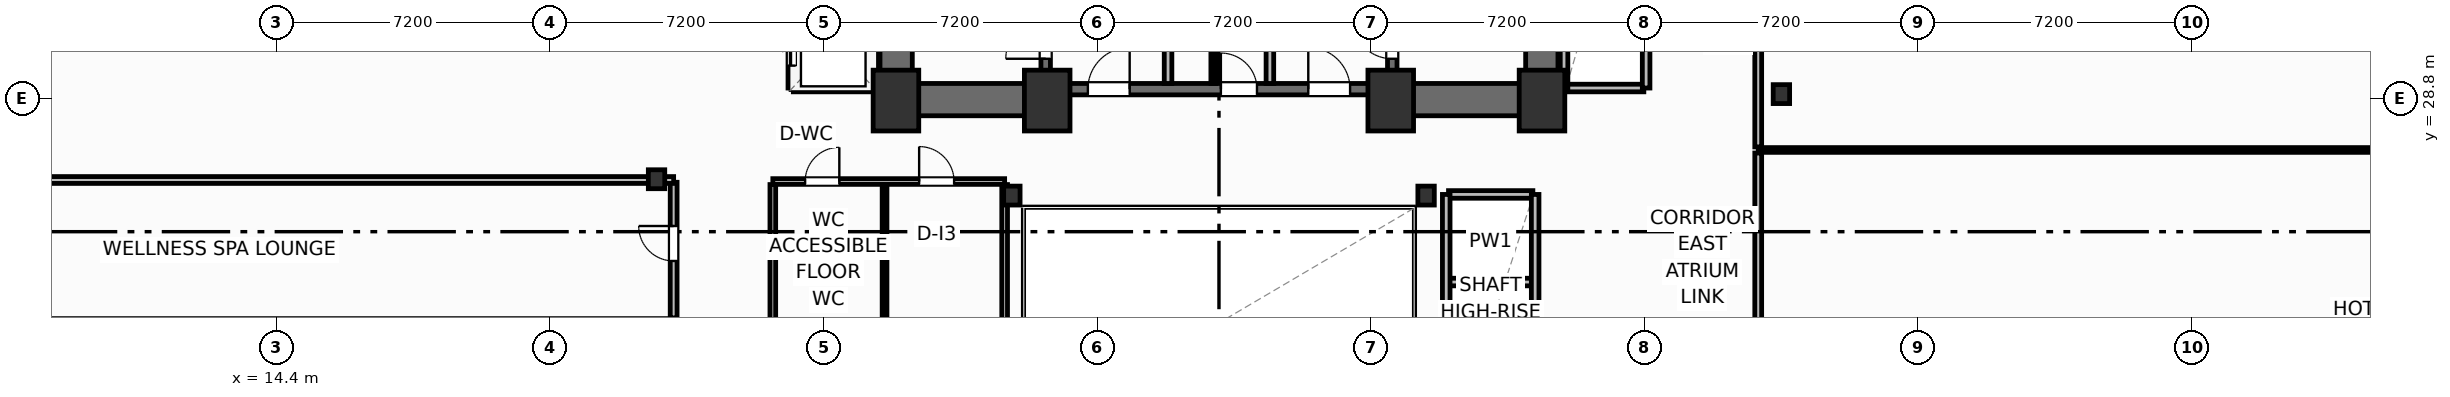
"""IFC4 building model, lengths in metres.
Left out: names, types, materials, properties, quantities, classifications, styles, units other than length and angle.
Written with IfcOpenShell. Run it as: python <this file> out.ifc"""

import sys

from ifc_helpers import new_model, si_unit, direction, frame, frame_2d, origin, origin_2d, place, context, subcontext, project, spatial, rectangle, i_section, extrude, element, fill, save


model = new_model("IFC4")
c1 = context("Model", 3, precision=1e-05, world=origin(), true_north=direction((0.0, 1.0)))
c2 = subcontext(c1, "Body", "Model", "MODEL_VIEW")
j1 = project(units=[si_unit("LENGTHUNIT", "METRE"), si_unit("PLANEANGLEUNIT", "RADIAN")], contexts=[c1])
p1 = place(None, origin())
s1 = spatial("IfcSite", under=j1, at=p1, CompositionType="ELEMENT")
p2 = place(p1, origin())
s2 = spatial("IfcBuilding", under=s1, at=p2, CompositionType="ELEMENT")
p3 = place(p2, frame((0.0, 0.0, 45.5)))
s3 = spatial("IfcBuildingStorey", under=s2, at=p3, CompositionType="ELEMENT", Elevation=45.5)
for number, where, z_axis, x_axis in (
    (1, (30.7, 28.75, 0.0), (0.0, 0.0, 1.0), (1.0, 0.0, 0.0)),
    (2, (34.68, 28.75, 0.0), (0.0, 0.0, 1.0), (1.0, 0.0, 0.0)),
    (3, (43.72, 28.75, 0.0), (0.0, 0.0, 1.0), (1.0, 0.0, 0.0)),
    (4, (47.7, 28.75, 0.0), (0.0, 0.0, 1.0), (1.0, 0.0, 0.0)),
):
    element("IfcColumn", number, at=place(p3, frame(where, z_axis=z_axis, x_axis=x_axis)), inside=s3, PredefinedType="COLUMN", context=c2, shape_type="SweptSolid", body=[
        extrude(rectangle(XDim=1.2, YDim=1.6, at=origin_2d()), origin(), (0.0, 0.0, 1.0), 3.7),
    ])
for number, where, z_axis, x_axis in (
    (5, (33.75, 26.25, 0.0), (0.0, 0.0, 1.0), (1.0, 0.0, 0.0)),
    (6, (44.65, 26.25, 0.0), (0.0, 0.0, 1.0), (1.0, 0.0, 0.0)),
    (7, (24.4, 26.68, 0.0), (0.0, 0.0, 1.0), (1.0, 0.0, 0.0)),
    (8, (54.0, 28.92, 0.0), (0.0, 0.0, 1.0), (1.0, 0.0, 0.0)),
):
    element("IfcColumn", number, at=place(p3, frame(where, z_axis=z_axis, x_axis=x_axis)), inside=s3, PredefinedType="COLUMN", context=c2, shape_type="SweptSolid", body=[
        extrude(i_section(OverallWidth=0.432, OverallDepth=0.498, WebThickness=0.056, FlangeThickness=0.089, FilletRadius=0.025, at=origin_2d()), origin(), (0.0, 0.0, 1.0), 3.7),
    ])
for number, where, z_axis, x_axis in (
    (9, (30.705, 29.2, 0.0), (0.0, 0.0, 1.0), (0.0, 1.0, 0.0)),
    (10, (47.695, 29.2, 0.0), (0.0, 0.0, 1.0), (0.0, 1.0, 0.0)),
):
    element("IfcWall", number, at=place(p3, frame(where, z_axis=z_axis, x_axis=x_axis)), inside=s3, PredefinedType="SHEAR", context=c2, shape_type="SweptSolid", body=[
        extrude(rectangle(XDim=9.22, YDim=0.85, at=frame_2d((4.61, 0.0))), origin(), (0.0, 0.0, 1.0), 3.45),
    ])
for number, where, z_axis, x_axis in (
    (11, (30.28, 28.775, 0.0), (0.0, 0.0, 1.0), (1.0, 0.0, 0.0)),
    (12, (43.6, 28.775, 0.0), (0.0, 0.0, 1.0), (1.0, 0.0, 0.0)),
):
    element("IfcWall", number, at=place(p3, frame(where, z_axis=z_axis, x_axis=x_axis)), inside=s3, PredefinedType="SHEAR", context=c2, shape_type="SweptSolid", body=[
        extrude(rectangle(XDim=4.52, YDim=0.85, at=frame_2d((2.26, 0.0))), origin(), (0.0, 0.0, 1.0), 3.45),
    ])
p4 = place(p3, frame((34.8, 29.05, 0.0), z_axis=(0.0, 0.0, 1.0), x_axis=(1.0, 0.0, 0.0)))
e13 = element("IfcWall", 13, at=p4, inside=s3, PredefinedType="SHEAR", context=c2, shape_type="SweptSolid", body=[
    extrude(rectangle(XDim=8.8, YDim=0.3, at=frame_2d((4.4, 0.0))), origin(), (0.0, 0.0, 1.0), 3.45),
])
p5 = place(p4, frame((0.95, 0.0, 0.0)))
e14 = element("IfcOpeningElement", 14, at=p5, cuts=e13, PredefinedType="OPENING", context=c2, shape_type="SweptSolid", body=[
    extrude(rectangle(XDim=1.1, YDim=2.15, at=frame_2d((0.55, 1.075))), frame((0.0, 0.16, 0.0), z_axis=(0.0, -1.0, 0.0), x_axis=(1.0, 0.0, 0.0)), (0.0, 0.0, 1.0), 0.32),
])
p6 = place(p4, frame((6.75, 0.0, 0.0)))
e15 = element("IfcOpeningElement", 15, at=p6, cuts=e13, PredefinedType="OPENING", context=c2, shape_type="SweptSolid", body=[
    extrude(rectangle(XDim=1.1, YDim=2.15, at=frame_2d((0.55, 1.075))), frame((0.0, 0.16, 0.0), z_axis=(0.0, -1.0, 0.0), x_axis=(1.0, 0.0, 0.0)), (0.0, 0.0, 1.0), 0.32),
])
p7 = place(p4, frame((4.45, 0.0, 0.0)))
e16 = element("IfcOpeningElement", 16, at=p7, cuts=e13, PredefinedType="OPENING", context=c2, shape_type="SweptSolid", body=[
    extrude(rectangle(XDim=0.95, YDim=2.15, at=frame_2d((0.475, 1.075))), frame((0.0, 0.16, 0.0), z_axis=(0.0, -1.0, 0.0), x_axis=(1.0, 0.0, 0.0)), (0.0, 0.0, 1.0), 0.32),
])
p8 = place(p3, frame((34.64, 29.2, 0.0), z_axis=(0.0, 0.0, 1.0), x_axis=(0.0, 1.0, 0.0)))
e17 = element("IfcWall", 17, at=p8, inside=s3, PredefinedType="SHEAR", context=c2, shape_type="SweptSolid", body=[
    extrude(rectangle(XDim=9.22, YDim=0.25, at=frame_2d((4.61, 0.0))), origin(), (0.0, 0.0, 1.0), 3.45),
])
p9 = place(p8, frame((0.65, 0.0, 0.0)))
e18 = element("IfcOpeningElement", 18, at=p9, cuts=e17, PredefinedType="OPENING", context=c2, shape_type="SweptSolid", body=[
    extrude(rectangle(XDim=1.05, YDim=2.15, at=frame_2d((0.525, 1.075))), frame((0.0, 0.135, 0.0), z_axis=(0.0, -1.0, 0.0), x_axis=(1.0, 0.0, 0.0)), (0.0, 0.0, 1.0), 0.27),
])
p10 = place(p3, frame((43.76, 29.2, 0.0), z_axis=(0.0, 0.0, 1.0), x_axis=(0.0, 1.0, 0.0)))
e19 = element("IfcWall", 19, at=p10, inside=s3, PredefinedType="SHEAR", context=c2, shape_type="SweptSolid", body=[
    extrude(rectangle(XDim=9.22, YDim=0.25, at=frame_2d((4.61, 0.0))), origin(), (0.0, 0.0, 1.0), 3.45),
])
p11 = place(p10, frame((0.65, 0.0, 0.0)))
e20 = element("IfcOpeningElement", 20, at=p11, cuts=e19, PredefinedType="OPENING", context=c2, shape_type="SweptSolid", body=[
    extrude(rectangle(XDim=1.05, YDim=2.15, at=frame_2d((0.525, 1.075))), frame((0.0, 0.135, 0.0), z_axis=(0.0, -1.0, 0.0), x_axis=(1.0, 0.0, 0.0)), (0.0, 0.0, 1.0), 0.27),
])
p12 = place(p3, frame((-2.728, 23.605, 0.0), z_axis=(0.0, 0.0, 1.0), x_axis=(0.823535075462, -0.567265351915, 0.0)))
e21 = element("IfcWall", 21, at=p12, inside=s3, PredefinedType="SOLIDWALL", context=c2, shape_type="SweptSolid", body=[
    extrude(rectangle(XDim=23.247, YDim=0.22, at=frame_2d((11.624, 0.0))), origin(), (0.0, 0.0, 1.0), 2.73),
])
p13 = place(p12, frame((3.887, 0.0, 0.8)))
e22 = element("IfcOpeningElement", 22, at=p13, cuts=e21, PredefinedType="OPENING", context=c2, shape_type="SweptSolid", body=[
    extrude(rectangle(XDim=1.65, YDim=1.65, at=frame_2d((0.825, 0.825))), frame((0.0, 0.12, 0.0), z_axis=(0.0, -1.0, 0.0), x_axis=(1.0, 0.0, 0.0)), (0.0, 0.0, 1.0), 0.24),
])
p14 = place(p3, frame((81.127, 26.995, 0.0), z_axis=(0.0, 0.0, 1.0), x_axis=(-0.823530169317, 0.567272474411, 0.0)))
e23 = element("IfcWall", 23, at=p14, inside=s3, PredefinedType="SOLIDWALL", context=c2, shape_type="SweptSolid", body=[
    extrude(rectangle(XDim=23.247, YDim=0.22, at=frame_2d((11.624, 0.0))), origin(), (0.0, 0.0, 1.0), 2.73),
])
p15 = place(p14, frame((10.799, 0.0, 0.8)))
e24 = element("IfcOpeningElement", 24, at=p15, cuts=e23, PredefinedType="OPENING", context=c2, shape_type="SweptSolid", body=[
    extrude(rectangle(XDim=1.65, YDim=1.65, at=frame_2d((0.825, 0.825))), frame((0.0, 0.12, 0.0), z_axis=(0.0, -1.0, 0.0), x_axis=(1.0, 0.0, 0.0)), (0.0, 0.0, 1.0), 0.24),
])
p16 = place(p3, frame((24.85, 23.03, 0.0), z_axis=(0.0, 0.0, 1.0), x_axis=(0.0, 1.0, 0.0)))
e25 = element("IfcWall", 25, at=p16, inside=s3, PredefinedType="PARTITIONING", context=c2, shape_type="SweptSolid", body=[
    extrude(rectangle(XDim=3.57, YDim=0.18, at=frame_2d((1.785, 0.0))), origin(), (0.0, 0.0, 1.0), 3.45),
])
p17 = place(p16, frame((1.5, 0.0, 0.0)))
e26 = element("IfcOpeningElement", 26, at=p17, cuts=e25, PredefinedType="OPENING", context=c2, shape_type="SweptSolid", body=[
    extrude(rectangle(XDim=0.92, YDim=2.05, at=frame_2d((0.46, 1.025))), frame((0.0, 0.1, 0.0), z_axis=(0.0, -1.0, 0.0), x_axis=(1.0, 0.0, 0.0)), (0.0, 0.0, 1.0), 0.2),
])
p18 = place(p3, frame((0.2, 26.66, 0.0), z_axis=(0.0, 0.0, 1.0), x_axis=(1.0, 0.0, 0.0)))
e27 = element("IfcWall", 27, at=p18, inside=s3, PredefinedType="PARTITIONING", context=c2, shape_type="SweptSolid", body=[
    extrude(rectangle(XDim=24.65, YDim=0.18, at=frame_2d((12.325, 0.0))), origin(), (0.0, 0.0, 1.0), 2.662),
])
p19 = place(p3, frame((53.39, 19.3, 0.0), z_axis=(0.0, 0.0, 1.0), x_axis=(0.0, 1.0, 0.0)))
e28 = element("IfcWall", 28, at=p19, inside=s3, PredefinedType="PARTITIONING", context=c2, shape_type="SweptSolid", body=[
    extrude(rectangle(XDim=8.07, YDim=0.18, at=frame_2d((4.035, 0.0))), origin(), (0.0, 0.0, 1.0), 3.45),
])
p20 = place(p19, frame((2.2, 0.0, 0.0)))
e29 = element("IfcOpeningElement", 29, at=p20, cuts=e28, PredefinedType="OPENING", context=c2, shape_type="SweptSolid", body=[
    extrude(rectangle(XDim=0.92, YDim=2.05, at=frame_2d((0.46, 1.025))), frame((0.0, 0.1, 0.0), z_axis=(0.0, -1.0, 0.0), x_axis=(1.0, 0.0, 0.0)), (0.0, 0.0, 1.0), 0.2),
])
p21 = place(p3, frame((53.39, 27.53, 0.0), z_axis=(0.0, 0.0, 1.0), x_axis=(0.0, 1.0, 0.0)))
e30 = element("IfcWall", 30, at=p21, inside=s3, PredefinedType="PARTITIONING", context=c2, shape_type="SweptSolid", body=[
    extrude(rectangle(XDim=11.67, YDim=0.18, at=frame_2d((5.835, 0.0))), origin(), (0.0, 0.0, 1.0), 3.45),
])
p22 = place(p21, frame((5.8, 0.0, 0.0)))
e31 = element("IfcOpeningElement", 31, at=p22, cuts=e30, PredefinedType="OPENING", context=c2, shape_type="SweptSolid", body=[
    extrude(rectangle(XDim=0.92, YDim=2.05, at=frame_2d((0.46, 1.025))), frame((0.0, 0.1, 0.0), z_axis=(0.0, -1.0, 0.0), x_axis=(1.0, 0.0, 0.0)), (0.0, 0.0, 1.0), 0.2),
])
p23 = place(p3, frame((53.39, 27.45, 0.0), z_axis=(0.0, 0.0, 1.0), x_axis=(1.0, 0.0, 0.0)))
e32 = element("IfcWall", 32, at=p23, inside=s3, PredefinedType="PARTITIONING", context=c2, shape_type="SweptSolid", body=[
    extrude(rectangle(XDim=23.61, YDim=0.125, at=frame_2d((11.805, 0.0))), origin(), (0.0, 0.0, 1.0), 3.45),
])
for number, where, z_axis, x_axis in (
    (33, (37.86, 29.2, 0.0), (0.0, 0.0, 1.0), (0.0, 1.0, 0.0)),
    (34, (40.54, 29.2, 0.0), (0.0, 0.0, 1.0), (0.0, 1.0, 0.0)),
):
    element("IfcWall", number, at=place(p3, frame(where, z_axis=z_axis, x_axis=x_axis)), inside=s3, PredefinedType="PARTITIONING", context=c2, shape_type="SweptSolid", body=[
        extrude(rectangle(XDim=5.18, YDim=0.2, at=frame_2d((2.59, 0.0))), origin(), (0.0, 0.0, 1.0), 3.45),
    ])
p24 = place(p3, frame((39.05, 29.2, 0.0), z_axis=(0.0, 0.0, 1.0), x_axis=(0.0, 1.0, 0.0)))
e35 = element("IfcWall", 35, at=p24, inside=s3, PredefinedType="PARTITIONING", context=c2, shape_type="SweptSolid", body=[
    extrude(rectangle(XDim=5.22, YDim=0.125, at=frame_2d((2.61, 0.0))), origin(), (0.0, 0.0, 1.0), 3.45),
])
p25 = place(p24, frame((2.05, 0.0, 0.0)))
e36 = element("IfcOpeningElement", 36, at=p25, cuts=e35, PredefinedType="OPENING", context=c2, shape_type="SweptSolid", body=[
    extrude(rectangle(XDim=0.85, YDim=2.05, at=frame_2d((0.425, 1.025))), frame((0.0, 0.073, 0.0), z_axis=(0.0, -1.0, 0.0), x_axis=(1.0, 0.0, 0.0)), (0.0, 0.0, 1.0), 0.145),
])
p26 = place(p3, frame((27.46, 26.62, 0.0), z_axis=(0.0, 0.0, 1.0), x_axis=(1.0, 0.0, 0.0)))
e37 = element("IfcWall", 37, at=p26, inside=s3, PredefinedType="PARTITIONING", context=c2, shape_type="SweptSolid", body=[
    extrude(rectangle(XDim=6.1, YDim=0.15, at=frame_2d((3.05, 0.0))), origin(), (0.0, 0.0, 1.0), 2.662),
])
p27 = place(p26, frame((0.85, 0.0, 0.0)))
e38 = element("IfcOpeningElement", 38, at=p27, cuts=e37, PredefinedType="OPENING", context=c2, shape_type="SweptSolid", body=[
    extrude(rectangle(XDim=0.9, YDim=2.05, at=frame_2d((0.45, 1.025))), frame((0.0, 0.085, 0.0), z_axis=(0.0, -1.0, 0.0), x_axis=(1.0, 0.0, 0.0)), (0.0, 0.0, 1.0), 0.17),
])
p28 = place(p26, frame((3.85, 0.0, 0.0)))
e39 = element("IfcOpeningElement", 39, at=p28, cuts=e37, PredefinedType="OPENING", context=c2, shape_type="SweptSolid", body=[
    extrude(rectangle(XDim=0.92, YDim=2.05, at=frame_2d((0.46, 1.025))), frame((0.0, 0.085, 0.0), z_axis=(0.0, -1.0, 0.0), x_axis=(1.0, 0.0, 0.0)), (0.0, 0.0, 1.0), 0.17),
])
p29 = place(p3, frame((30.4, 23.0, 0.0), z_axis=(0.0, 0.0, 1.0), x_axis=(0.0, 1.0, 0.0)))
e40 = element("IfcWall", 40, at=p29, inside=s3, PredefinedType="PARTITIONING", context=c2, shape_type="SweptSolid", body=[
    extrude(rectangle(XDim=3.54, YDim=0.125, at=frame_2d((1.77, 0.0))), origin(), (0.0, 0.0, 1.0), 3.45),
])
p30 = place(p3, frame((27.46, 19.38, 0.0), z_axis=(0.0, 0.0, 1.0), x_axis=(0.0, 1.0, 0.0)))
e41 = element("IfcWall", 41, at=p30, inside=s3, PredefinedType="PARTITIONING", context=c2, shape_type="SweptSolid", body=[
    extrude(rectangle(XDim=7.16, YDim=0.15, at=frame_2d((3.58, 0.0))), origin(), (0.0, 0.0, 1.0), 3.45),
])
p31 = place(p30, frame((1.1, 0.0, 0.0)))
e42 = element("IfcOpeningElement", 42, at=p31, cuts=e41, PredefinedType="OPENING", context=c2, shape_type="SweptSolid", body=[
    extrude(rectangle(XDim=0.95, YDim=2.05, at=frame_2d((0.475, 1.025))), frame((0.0, 0.085, 0.0), z_axis=(0.0, -1.0, 0.0), x_axis=(1.0, 0.0, 0.0)), (0.0, 0.0, 1.0), 0.17),
])
p32 = place(p3, frame((33.56, 19.38, 0.0), z_axis=(0.0, 0.0, 1.0), x_axis=(0.0, 1.0, 0.0)))
e43 = element("IfcWall", 43, at=p32, inside=s3, PredefinedType="PARTITIONING", context=c2, shape_type="SweptSolid", body=[
    extrude(rectangle(XDim=7.16, YDim=0.15, at=frame_2d((3.58, 0.0))), origin(), (0.0, 0.0, 1.0), 2.824),
])
p33 = place(p3, frame((28.0, 29.08, 0.0), z_axis=(0.0, 0.0, 1.0), x_axis=(1.0, 0.0, 0.0)))
e44 = element("IfcWall", 44, at=p33, inside=s3, PredefinedType="PARTITIONING", context=c2, shape_type="SweptSolid", body=[
    extrude(rectangle(XDim=2.1, YDim=0.2, at=frame_2d((1.05, 0.0))), origin(), (0.0, 0.0, 1.0), 3.45),
])
p34 = place(p3, frame((30.12, 29.08, 0.0), z_axis=(0.0, 0.0, 1.0), x_axis=(0.0, 1.0, 0.0)))
e45 = element("IfcWall", 45, at=p34, inside=s3, PredefinedType="PARTITIONING", context=c2, shape_type="SweptSolid", body=[
    extrude(rectangle(XDim=6.89, YDim=0.2, at=frame_2d((3.445, 0.0))), origin(), (0.0, 0.0, 1.0), 3.45),
])
p35 = place(p3, frame((27.96, 29.08, 0.0), z_axis=(0.0, 0.0, 1.0), x_axis=(0.0, 1.0, 0.0)))
e46 = element("IfcWall", 46, at=p35, inside=s3, PredefinedType="PARTITIONING", context=c2, shape_type="SweptSolid", body=[
    extrude(rectangle(XDim=6.89, YDim=0.2, at=frame_2d((3.445, 0.0))), origin(), (0.0, 0.0, 1.0), 3.45),
])
p36 = place(p35, frame((0.59, 0.0, 0.0)))
e47 = element("IfcOpeningElement", 47, at=p36, cuts=e46, PredefinedType="OPENING", context=c2, shape_type="SweptSolid", body=[
    extrude(rectangle(XDim=1.1, YDim=2.15, at=frame_2d((0.55, 1.075))), frame((0.0, 0.11, 0.0), z_axis=(0.0, -1.0, 0.0), x_axis=(1.0, 0.0, 0.0)), (0.0, 0.0, 1.0), 0.22),
])
p37 = place(p35, frame((2.89, 0.0, 0.0)))
e48 = element("IfcOpeningElement", 48, at=p37, cuts=e46, PredefinedType="OPENING", context=c2, shape_type="SweptSolid", body=[
    extrude(rectangle(XDim=1.1, YDim=2.15, at=frame_2d((0.55, 1.075))), frame((0.0, 0.11, 0.0), z_axis=(0.0, -1.0, 0.0), x_axis=(1.0, 0.0, 0.0)), (0.0, 0.0, 1.0), 0.22),
])
p38 = place(p35, frame((5.19, 0.0, 0.0)))
e49 = element("IfcOpeningElement", 49, at=p38, cuts=e46, PredefinedType="OPENING", context=c2, shape_type="SweptSolid", body=[
    extrude(rectangle(XDim=1.1, YDim=2.15, at=frame_2d((0.55, 1.075))), frame((0.0, 0.11, 0.0), z_axis=(0.0, -1.0, 0.0), x_axis=(1.0, 0.0, 0.0)), (0.0, 0.0, 1.0), 0.22),
])
p39 = place(p3, frame((48.32, 29.08, 0.0), z_axis=(0.0, 0.0, 1.0), x_axis=(1.0, 0.0, 0.0)))
e50 = element("IfcWall", 50, at=p39, inside=s3, PredefinedType="PARTITIONING", context=c2, shape_type="SweptSolid", body=[
    extrude(rectangle(XDim=2.06, YDim=0.2, at=frame_2d((1.03, 0.0))), origin(), (0.0, 0.0, 1.0), 2.662),
])
for number, where, z_axis, x_axis in (
    (51, (48.28, 29.08, 0.0), (0.0, 0.0, 1.0), (0.0, 1.0, 0.0)),
    (52, (50.44, 29.08, 0.0), (0.0, 0.0, 1.0), (0.0, 1.0, 0.0)),
):
    element("IfcWall", number, at=place(p3, frame(where, z_axis=z_axis, x_axis=x_axis)), inside=s3, PredefinedType="PARTITIONING", context=c2, shape_type="SweptSolid", body=[
        extrude(rectangle(XDim=6.89, YDim=0.2, at=frame_2d((3.445, 0.0))), origin(), (0.0, 0.0, 1.0), 3.45),
    ])
for number, where, z_axis, x_axis in (
    (53, (45.24, 23.975, 0.0), (0.0, 0.0, 1.0), (1.0, 0.0, 0.0)),
    (54, (45.24, 26.28, 0.0), (0.0, 0.0, 1.0), (1.0, 0.0, 0.0)),
):
    element("IfcWall", number, at=place(p3, frame(where, z_axis=z_axis, x_axis=x_axis)), inside=s3, PredefinedType="PARTITIONING", context=c2, shape_type="SweptSolid", body=[
        extrude(rectangle(XDim=2.22, YDim=0.2, at=frame_2d((1.11, 0.0))), origin(), (0.0, 0.0, 1.0), 3.45),
    ])
for number, where, z_axis, x_axis in (
    (55, (45.18, 19.38, 0.0), (0.0, 0.0, 1.0), (0.0, 1.0, 0.0)),
    (56, (47.52, 19.38, 0.0), (0.0, 0.0, 1.0), (0.0, 1.0, 0.0)),
):
    element("IfcWall", number, at=place(p3, frame(where, z_axis=z_axis, x_axis=x_axis)), inside=s3, PredefinedType="PARTITIONING", context=c2, shape_type="SweptSolid", body=[
        extrude(rectangle(XDim=6.9, YDim=0.2, at=frame_2d((3.45, 0.0))), origin(), (0.0, 0.0, 1.0), 3.45),
    ])
p40 = place(p17, origin())
e57 = element("IfcDoor", 57, at=p40, inside=s3, OperationType="SINGLE_SWING_RIGHT", PredefinedType="DOOR", context=c2, shape_type="SweptSolid", body=[
    extrude(rectangle(XDim=0.92, YDim=2.05, at=frame_2d((0.46, 1.025))), frame((0.0, 0.025, 0.0), z_axis=(0.0, -1.0, 0.0), x_axis=(1.0, 0.0, 0.0)), (0.0, 0.0, 1.0), 0.05),
])
fill(e26, e57)
p41 = place(p9, origin())
e58 = element("IfcDoor", 58, at=p41, inside=s3, OperationType="SINGLE_SWING_LEFT", PredefinedType="DOOR", context=c2, shape_type="SweptSolid", body=[
    extrude(rectangle(XDim=1.05, YDim=2.15, at=frame_2d((0.525, 1.075))), frame((0.0, 0.025, 0.0), z_axis=(0.0, -1.0, 0.0), x_axis=(1.0, 0.0, 0.0)), (0.0, 0.0, 1.0), 0.05),
])
fill(e18, e58)
p42 = place(p11, origin())
e59 = element("IfcDoor", 59, at=p42, inside=s3, OperationType="SINGLE_SWING_RIGHT", PredefinedType="DOOR", context=c2, shape_type="SweptSolid", body=[
    extrude(rectangle(XDim=1.05, YDim=2.15, at=frame_2d((0.525, 1.075))), frame((0.0, 0.025, 0.0), z_axis=(0.0, -1.0, 0.0), x_axis=(1.0, 0.0, 0.0)), (0.0, 0.0, 1.0), 0.05),
])
fill(e20, e59)
p43 = place(p5, origin())
e60 = element("IfcDoor", 60, at=p43, inside=s3, OperationType="SINGLE_SWING_RIGHT", PredefinedType="DOOR", context=c2, shape_type="SweptSolid", body=[
    extrude(rectangle(XDim=1.1, YDim=2.15, at=frame_2d((0.55, 1.075))), frame((0.0, 0.025, 0.0), z_axis=(0.0, -1.0, 0.0), x_axis=(1.0, 0.0, 0.0)), (0.0, 0.0, 1.0), 0.05),
])
fill(e14, e60)
p44 = place(p6, origin())
e61 = element("IfcDoor", 61, at=p44, inside=s3, OperationType="SINGLE_SWING_LEFT", PredefinedType="DOOR", context=c2, shape_type="SweptSolid", body=[
    extrude(rectangle(XDim=1.1, YDim=2.15, at=frame_2d((0.55, 1.075))), frame((0.0, 0.025, 0.0), z_axis=(0.0, -1.0, 0.0), x_axis=(1.0, 0.0, 0.0)), (0.0, 0.0, 1.0), 0.05),
])
fill(e15, e61)
p45 = place(p7, origin())
e62 = element("IfcDoor", 62, at=p45, inside=s3, OperationType="SINGLE_SWING_LEFT", PredefinedType="DOOR", context=c2, shape_type="SweptSolid", body=[
    extrude(rectangle(XDim=0.95, YDim=2.15, at=frame_2d((0.475, 1.075))), frame((0.0, 0.025, 0.0), z_axis=(0.0, -1.0, 0.0), x_axis=(1.0, 0.0, 0.0)), (0.0, 0.0, 1.0), 0.05),
])
fill(e16, e62)
p46 = place(p27, origin())
e63 = element("IfcDoor", 63, at=p46, inside=s3, OperationType="SINGLE_SWING_RIGHT", PredefinedType="DOOR", context=c2, shape_type="SweptSolid", body=[
    extrude(rectangle(XDim=0.9, YDim=2.05, at=frame_2d((0.45, 1.025))), frame((0.0, 0.025, 0.0), z_axis=(0.0, -1.0, 0.0), x_axis=(1.0, 0.0, 0.0)), (0.0, 0.0, 1.0), 0.05),
])
fill(e38, e63)
p47 = place(p28, origin())
e64 = element("IfcDoor", 64, at=p47, inside=s3, OperationType="SINGLE_SWING_LEFT", PredefinedType="DOOR", context=c2, shape_type="SweptSolid", body=[
    extrude(rectangle(XDim=0.92, YDim=2.05, at=frame_2d((0.46, 1.025))), frame((0.0, 0.025, 0.0), z_axis=(0.0, -1.0, 0.0), x_axis=(1.0, 0.0, 0.0)), (0.0, 0.0, 1.0), 0.05),
])
fill(e39, e64)
p48 = place(p36, origin())
e65 = element("IfcDoor", 65, at=p48, inside=s3, OperationType="SLIDING_TO_LEFT", PredefinedType="DOOR", context=c2, shape_type="SweptSolid", body=[
    extrude(rectangle(XDim=1.1, YDim=2.15, at=frame_2d((0.55, 1.075))), frame((0.0, 0.025, 0.0), z_axis=(0.0, -1.0, 0.0), x_axis=(1.0, 0.0, 0.0)), (0.0, 0.0, 1.0), 0.05),
])
fill(e47, e65)
save(model, sys.argv[1])
